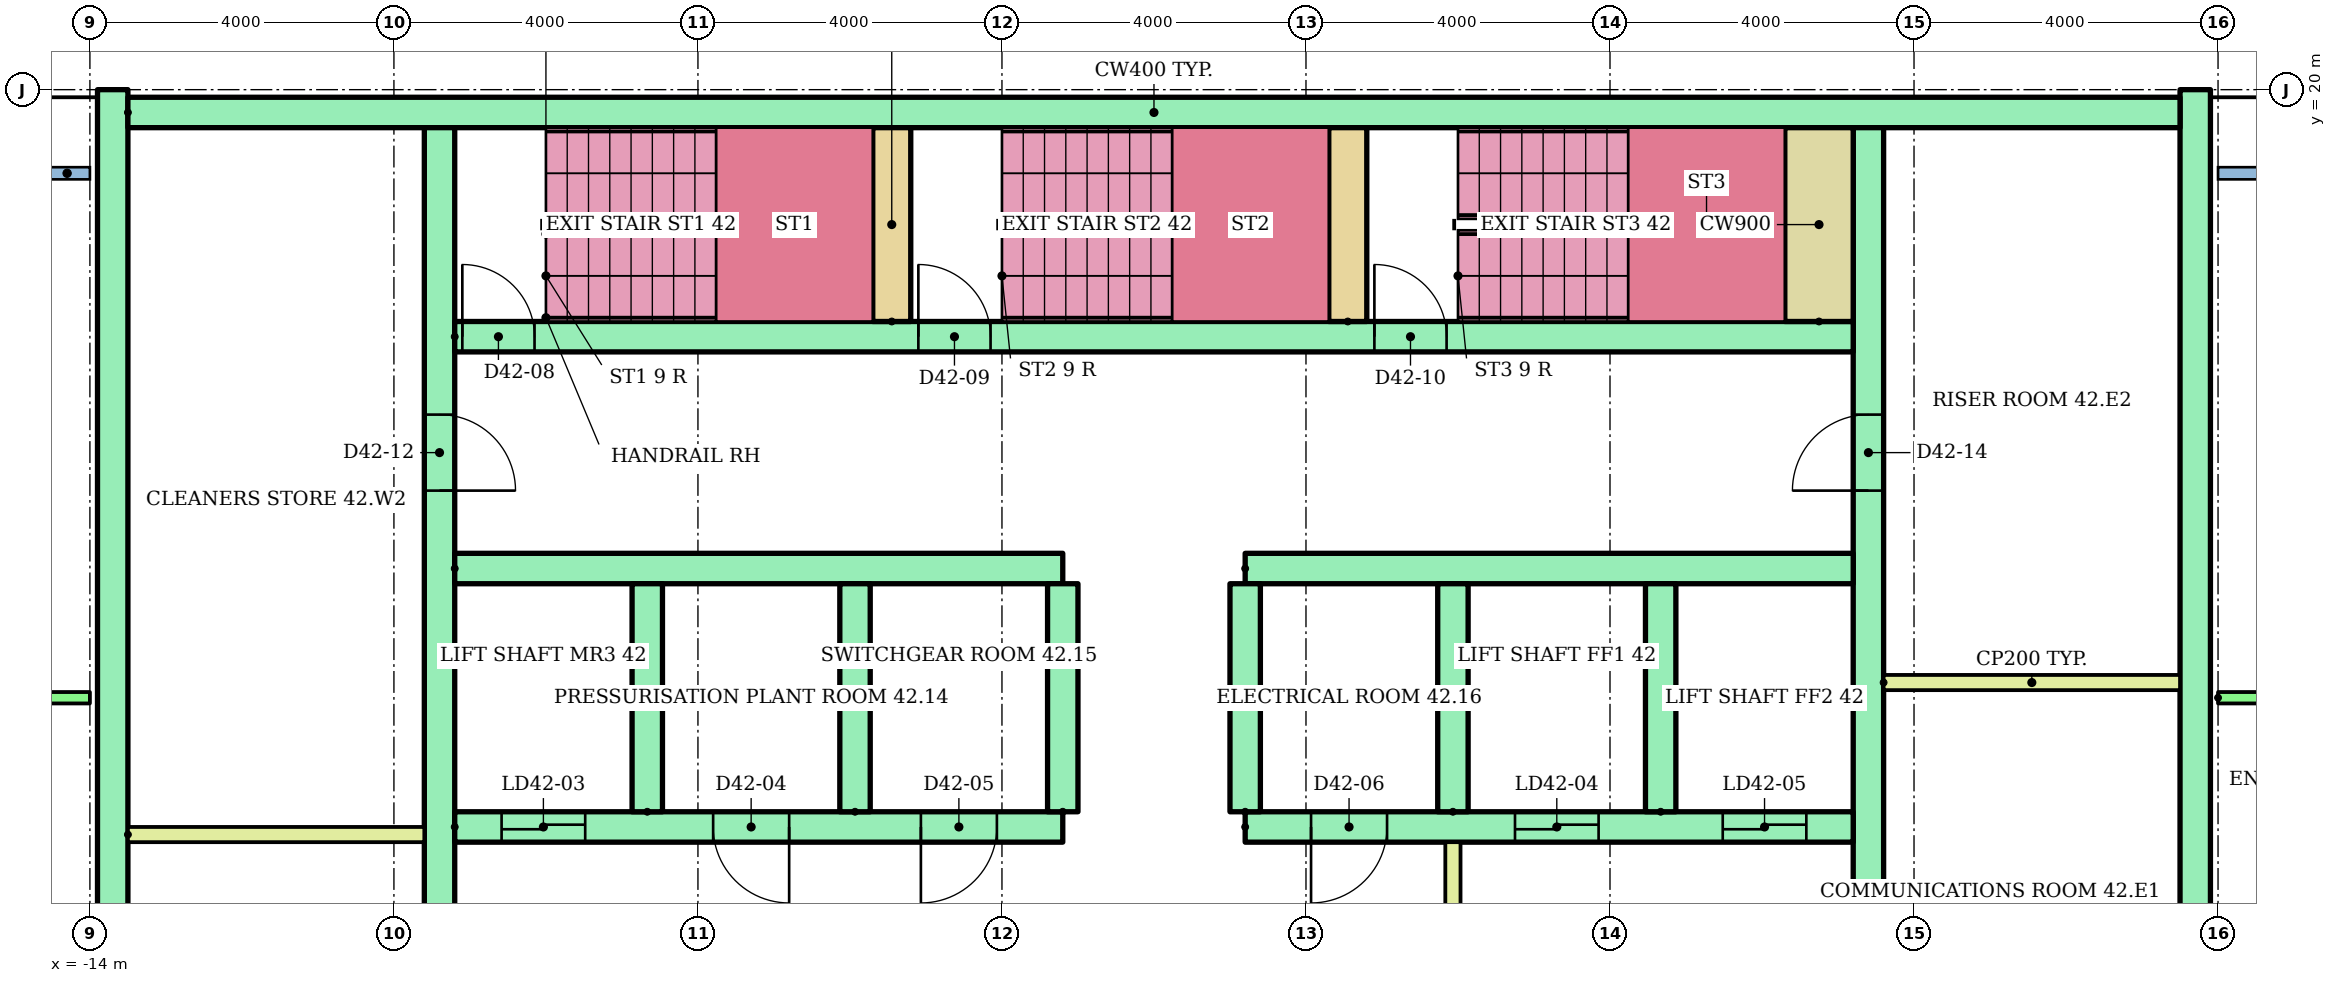
"""IFC4 building model, lengths in metres.
Left out: names, types, materials, properties, quantities, classifications, styles, units other than length and angle.
Written with IfcOpenShell. Run it as: python <this file> out.ifc"""

import sys

from ifc_helpers import new_model, si_unit, direction, frame, frame_2d, origin, place, context, subcontext, project, spatial, rectangle, extrude, element, fill, save


model = new_model("IFC4")
c1 = context("Model", 3, precision=1e-05, world=origin(), true_north=direction((0.0, 1.0)))
c2 = subcontext(c1, "Body", "Model", "MODEL_VIEW")
j1 = project(units=[si_unit("LENGTHUNIT", "METRE"), si_unit("PLANEANGLEUNIT", "RADIAN")], contexts=[c1])
p1 = place(None, origin())
s1 = spatial("IfcSite", under=j1, at=p1, CompositionType="ELEMENT")
p2 = place(p1, origin())
s2 = spatial("IfcBuilding", under=s1, at=p2, CompositionType="ELEMENT")
p3 = place(p2, frame((0.0, 0.0, 165.3)))
s3 = spatial("IfcBuildingStorey", under=s2, at=p3, CompositionType="ELEMENT", Elevation=165.3)
for number, where, z_axis, x_axis in (
    (1, (-13.7, 3.0, 0.0), (0.0, 0.0, 1.0), (0.0, 1.0, 0.0)),
    (2, (13.7, 3.0, 0.0), (0.0, 0.0, 1.0), (0.0, 1.0, 0.0)),
):
    element("IfcWall", number, at=place(p3, frame(where, z_axis=z_axis, x_axis=x_axis)), inside=s3, PredefinedType="SHEAR", context=c2, shape_type="SweptSolid", body=[
        extrude(rectangle(XDim=17.0, YDim=0.4, at=frame_2d((8.5, 0.0))), origin(), (0.0, 0.0, 1.0), 2.92),
    ])
p4 = place(p3, frame((-13.5, 19.7, 0.0)))
e3 = element("IfcWall", 3, at=p4, inside=s3, PredefinedType="SHEAR", context=c2, shape_type="SweptSolid", body=[
    extrude(rectangle(XDim=27.0, YDim=0.4, at=frame_2d((13.5, 0.0))), origin(), (0.0, 0.0, 1.0), 2.92),
])
p5 = place(p3, frame((-9.4, 6.8, 0.0), z_axis=(0.0, 0.0, 1.0), x_axis=(0.0, 1.0, 0.0)))
e4 = element("IfcWall", 4, at=p5, inside=s3, PredefinedType="SHEAR", context=c2, shape_type="SweptSolid", body=[
    extrude(rectangle(XDim=12.7, YDim=0.4, at=frame_2d((6.35, 0.0))), origin(), (0.0, 0.0, 1.0), 2.92),
])
p6 = place(p5, frame((1.15, 0.0, 0.0)))
e5 = element("IfcOpeningElement", 5, at=p6, cuts=e4, PredefinedType="OPENING", context=c2, shape_type="SweptSolid", body=[
    extrude(rectangle(XDim=1.0, YDim=2.1, at=frame_2d((0.5, 1.05))), frame((0.0, 0.21, 0.0), z_axis=(0.0, -1.0, 0.0), x_axis=(1.0, 0.0, 0.0)), (0.0, 0.0, 1.0), 0.42),
])
p7 = place(p5, frame((7.925, 0.0, 0.0)))
e6 = element("IfcOpeningElement", 6, at=p7, cuts=e4, PredefinedType="OPENING", context=c2, shape_type="SweptSolid", body=[
    extrude(rectangle(XDim=1.0, YDim=2.1, at=frame_2d((0.5, 1.05))), frame((0.0, 0.21, 0.0), z_axis=(0.0, -1.0, 0.0), x_axis=(1.0, 0.0, 0.0)), (0.0, 0.0, 1.0), 0.42),
])
p8 = place(p3, frame((9.4, 6.8, 0.0), z_axis=(0.0, 0.0, 1.0), x_axis=(0.0, 1.0, 0.0)))
e7 = element("IfcWall", 7, at=p8, inside=s3, PredefinedType="SHEAR", context=c2, shape_type="SweptSolid", body=[
    extrude(rectangle(XDim=12.7, YDim=0.4, at=frame_2d((6.35, 0.0))), origin(), (0.0, 0.0, 1.0), 2.92),
])
p9 = place(p8, frame((1.15, 0.0, 0.0)))
e8 = element("IfcOpeningElement", 8, at=p9, cuts=e7, PredefinedType="OPENING", context=c2, shape_type="SweptSolid", body=[
    extrude(rectangle(XDim=1.0, YDim=2.1, at=frame_2d((0.5, 1.05))), frame((0.0, 0.21, 0.0), z_axis=(0.0, -1.0, 0.0), x_axis=(1.0, 0.0, 0.0)), (0.0, 0.0, 1.0), 0.42),
])
p10 = place(p8, frame((7.925, 0.0, 0.0)))
e9 = element("IfcOpeningElement", 9, at=p10, cuts=e7, PredefinedType="OPENING", context=c2, shape_type="SweptSolid", body=[
    extrude(rectangle(XDim=1.0, YDim=2.1, at=frame_2d((0.5, 1.05))), frame((0.0, 0.21, 0.0), z_axis=(0.0, -1.0, 0.0), x_axis=(1.0, 0.0, 0.0)), (0.0, 0.0, 1.0), 0.42),
])
p11 = place(p3, frame((-9.2, 10.3, 0.0)))
e10 = element("IfcWall", 10, at=p11, inside=s3, PredefinedType="SHEAR", context=c2, shape_type="SweptSolid", body=[
    extrude(rectangle(XDim=8.0, YDim=0.4, at=frame_2d((4.0, 0.0))), origin(), (0.0, 0.0, 1.0), 2.92),
])
p12 = place(p11, frame((0.617, 0.0, 0.0)))
e11 = element("IfcOpeningElement", 11, at=p12, cuts=e10, PredefinedType="OPENING", context=c2, shape_type="SweptSolid", body=[
    extrude(rectangle(XDim=1.1, YDim=2.1, at=frame_2d((0.55, 1.05))), frame((0.0, 0.21, 0.0), z_axis=(0.0, -1.0, 0.0), x_axis=(1.0, 0.0, 0.0)), (0.0, 0.0, 1.0), 0.42),
])
p13 = place(p11, frame((3.4, 0.0, 0.0)))
e12 = element("IfcOpeningElement", 12, at=p13, cuts=e10, PredefinedType="OPENING", context=c2, shape_type="SweptSolid", body=[
    extrude(rectangle(XDim=1.0, YDim=2.1, at=frame_2d((0.5, 1.05))), frame((0.0, 0.21, 0.0), z_axis=(0.0, -1.0, 0.0), x_axis=(1.0, 0.0, 0.0)), (0.0, 0.0, 1.0), 0.42),
])
p14 = place(p11, frame((6.133, 0.0, 0.0)))
e13 = element("IfcOpeningElement", 13, at=p14, cuts=e10, PredefinedType="OPENING", context=c2, shape_type="SweptSolid", body=[
    extrude(rectangle(XDim=1.0, YDim=2.1, at=frame_2d((0.5, 1.05))), frame((0.0, 0.21, 0.0), z_axis=(0.0, -1.0, 0.0), x_axis=(1.0, 0.0, 0.0)), (0.0, 0.0, 1.0), 0.42),
])
p15 = place(p3, frame((-9.2, 13.7, 0.0)))
e14 = element("IfcWall", 14, at=p15, inside=s3, PredefinedType="SHEAR", context=c2, shape_type="SweptSolid", body=[
    extrude(rectangle(XDim=8.0, YDim=0.4, at=frame_2d((4.0, 0.0))), origin(), (0.0, 0.0, 1.0), 2.92),
])
p16 = place(p3, frame((1.2, 10.3, 0.0)))
e15 = element("IfcWall", 15, at=p16, inside=s3, PredefinedType="SHEAR", context=c2, shape_type="SweptSolid", body=[
    extrude(rectangle(XDim=8.0, YDim=0.4, at=frame_2d((4.0, 0.0))), origin(), (0.0, 0.0, 1.0), 2.92),
])
p17 = place(p16, frame((3.55, 0.0, 0.0)))
e16 = element("IfcOpeningElement", 16, at=p17, cuts=e15, PredefinedType="OPENING", context=c2, shape_type="SweptSolid", body=[
    extrude(rectangle(XDim=1.1, YDim=2.1, at=frame_2d((0.55, 1.05))), frame((0.0, 0.21, 0.0), z_axis=(0.0, -1.0, 0.0), x_axis=(1.0, 0.0, 0.0)), (0.0, 0.0, 1.0), 0.42),
])
p18 = place(p16, frame((6.283, 0.0, 0.0)))
e17 = element("IfcOpeningElement", 17, at=p18, cuts=e15, PredefinedType="OPENING", context=c2, shape_type="SweptSolid", body=[
    extrude(rectangle(XDim=1.1, YDim=2.1, at=frame_2d((0.55, 1.05))), frame((0.0, 0.21, 0.0), z_axis=(0.0, -1.0, 0.0), x_axis=(1.0, 0.0, 0.0)), (0.0, 0.0, 1.0), 0.42),
])
p19 = place(p16, frame((0.867, 0.0, 0.0)))
e18 = element("IfcOpeningElement", 18, at=p19, cuts=e15, PredefinedType="OPENING", context=c2, shape_type="SweptSolid", body=[
    extrude(rectangle(XDim=1.0, YDim=2.1, at=frame_2d((0.5, 1.05))), frame((0.0, 0.21, 0.0), z_axis=(0.0, -1.0, 0.0), x_axis=(1.0, 0.0, 0.0)), (0.0, 0.0, 1.0), 0.42),
])
p20 = place(p3, frame((1.2, 13.7, 0.0)))
e19 = element("IfcWall", 19, at=p20, inside=s3, PredefinedType="SHEAR", context=c2, shape_type="SweptSolid", body=[
    extrude(rectangle(XDim=8.0, YDim=0.4, at=frame_2d((4.0, 0.0))), origin(), (0.0, 0.0, 1.0), 2.92),
])
for number, where, z_axis, x_axis in (
    (20, (-6.667, 10.5, 0.0), (0.0, 0.0, 1.0), (0.0, 1.0, 0.0)),
    (21, (-3.933, 10.5, 0.0), (0.0, 0.0, 1.0), (0.0, 1.0, 0.0)),
    (22, (-1.2, 10.5, 0.0), (0.0, 0.0, 1.0), (0.0, 1.0, 0.0)),
    (23, (1.2, 10.5, 0.0), (0.0, 0.0, 1.0), (0.0, 1.0, 0.0)),
    (24, (3.933, 10.5, 0.0), (0.0, 0.0, 1.0), (0.0, 1.0, 0.0)),
    (25, (6.667, 10.5, 0.0), (0.0, 0.0, 1.0), (0.0, 1.0, 0.0)),
):
    element("IfcWall", number, at=place(p3, frame(where, z_axis=z_axis, x_axis=x_axis)), inside=s3, PredefinedType="SHEAR", context=c2, shape_type="SweptSolid", body=[
        extrude(rectangle(XDim=3.0, YDim=0.4, at=frame_2d((1.5, 0.0))), origin(), (0.0, 0.0, 1.0), 2.92),
    ])
p21 = place(p3, frame((3.933, 6.8, 0.0), z_axis=(0.0, 0.0, 1.0), x_axis=(0.0, 1.0, 0.0)))
e26 = element("IfcWall", 26, at=p21, inside=s3, PredefinedType="PARTITIONING", context=c2, shape_type="SweptSolid", body=[
    extrude(rectangle(XDim=3.3, YDim=0.2, at=frame_2d((1.65, 0.0))), origin(), (0.0, 0.0, 1.0), 2.92),
])
p22 = place(p21, frame((1.1, 0.0, 0.0)))
e27 = element("IfcOpeningElement", 27, at=p22, cuts=e26, PredefinedType="OPENING", context=c2, shape_type="SweptSolid", body=[
    extrude(rectangle(XDim=1.1, YDim=2.1, at=frame_2d((0.55, 1.05))), frame((0.0, 0.11, 0.0), z_axis=(0.0, -1.0, 0.0), x_axis=(1.0, 0.0, 0.0)), (0.0, 0.0, 1.0), 0.22),
])
p23 = place(p3, frame((-9.2, 16.75, 0.0)))
e28 = element("IfcWall", 28, at=p23, inside=s3, PredefinedType="SHEAR", context=c2, shape_type="SweptSolid", body=[
    extrude(rectangle(XDim=18.4, YDim=0.4, at=frame_2d((9.2, 0.0))), origin(), (0.0, 0.0, 1.0), 2.92),
])
p24 = place(p23, frame((0.1, 0.0, 0.0)))
e29 = element("IfcOpeningElement", 29, at=p24, cuts=e28, PredefinedType="OPENING", context=c2, shape_type="SweptSolid", body=[
    extrude(rectangle(XDim=0.95, YDim=2.1, at=frame_2d((0.475, 1.05))), frame((0.0, 0.21, 0.0), z_axis=(0.0, -1.0, 0.0), x_axis=(1.0, 0.0, 0.0)), (0.0, 0.0, 1.0), 0.42),
])
p25 = place(p23, frame((6.1, 0.0, 0.0)))
e30 = element("IfcOpeningElement", 30, at=p25, cuts=e28, PredefinedType="OPENING", context=c2, shape_type="SweptSolid", body=[
    extrude(rectangle(XDim=0.95, YDim=2.1, at=frame_2d((0.475, 1.05))), frame((0.0, 0.21, 0.0), z_axis=(0.0, -1.0, 0.0), x_axis=(1.0, 0.0, 0.0)), (0.0, 0.0, 1.0), 0.42),
])
p26 = place(p23, frame((12.1, 0.0, 0.0)))
e31 = element("IfcOpeningElement", 31, at=p26, cuts=e28, PredefinedType="OPENING", context=c2, shape_type="SweptSolid", body=[
    extrude(rectangle(XDim=0.95, YDim=2.1, at=frame_2d((0.475, 1.05))), frame((0.0, 0.21, 0.0), z_axis=(0.0, -1.0, 0.0), x_axis=(1.0, 0.0, 0.0)), (0.0, 0.0, 1.0), 0.42),
])
for number, where, z_axis, x_axis in (
    (32, (-3.45, 16.95, 0.0), (0.0, 0.0, 1.0), (0.0, 1.0, 0.0)),
    (33, (2.55, 16.95, 0.0), (0.0, 0.0, 1.0), (0.0, 1.0, 0.0)),
):
    element("IfcWall", number, at=place(p3, frame(where, z_axis=z_axis, x_axis=x_axis)), inside=s3, PredefinedType="SHEAR", context=c2, shape_type="SweptSolid", body=[
        extrude(rectangle(XDim=2.55, YDim=0.5, at=frame_2d((1.275, 0.0))), origin(), (0.0, 0.0, 1.0), 2.92),
    ])
p27 = place(p3, frame((8.75, 16.95, 0.0), z_axis=(0.0, 0.0, 1.0), x_axis=(0.0, 1.0, 0.0)))
e34 = element("IfcWall", 34, at=p27, inside=s3, PredefinedType="SHEAR", context=c2, shape_type="SweptSolid", body=[
    extrude(rectangle(XDim=2.55, YDim=0.9, at=frame_2d((1.275, 0.0))), origin(), (0.0, 0.0, 1.0), 2.92),
])
for number, where in (
    (35, (-13.5, 10.2, 0.0)),
    (36, (9.6, 12.2, 0.0)),
):
    element("IfcWall", number, at=place(p3, frame(where)), inside=s3, PredefinedType="PARTITIONING", context=c2, shape_type="SweptSolid", body=[
        extrude(rectangle(XDim=3.9, YDim=0.2, at=frame_2d((1.95, 0.0))), origin(), (0.0, 0.0, 1.0), 2.92),
    ])
p28 = place(p3, frame((-24.82, 12.0, 0.0)))
e37 = element("IfcWall", 37, at=p28, inside=s3, PredefinedType="PARTITIONING", context=c2, shape_type="SweptSolid", body=[
    extrude(rectangle(XDim=10.82, YDim=0.15, at=frame_2d((5.41, 0.0))), origin(), (0.0, 0.0, 1.0), 2.4),
])
p29 = place(p28, frame((1.273, 0.0, 0.0)))
e38 = element("IfcOpeningElement", 38, at=p29, cuts=e37, PredefinedType="OPENING", context=c2, shape_type="SweptSolid", body=[
    extrude(rectangle(XDim=1.0, YDim=2.1, at=frame_2d((0.5, 1.05))), frame((0.0, 0.085, 0.0), z_axis=(0.0, -1.0, 0.0), x_axis=(1.0, 0.0, 0.0)), (0.0, 0.0, 1.0), 0.17),
])
p30 = place(p28, frame((7.32, 0.0, 0.0)))
e39 = element("IfcOpeningElement", 39, at=p30, cuts=e37, PredefinedType="OPENING", context=c2, shape_type="SweptSolid", body=[
    extrude(rectangle(XDim=0.9, YDim=2.1, at=frame_2d((0.45, 1.05))), frame((0.0, 0.085, 0.0), z_axis=(0.0, -1.0, 0.0), x_axis=(1.0, 0.0, 0.0)), (0.0, 0.0, 1.0), 0.17),
])
p31 = place(p3, frame((14.0, 12.0, 0.0)))
e40 = element("IfcWall", 40, at=p31, inside=s3, PredefinedType="PARTITIONING", context=c2, shape_type="SweptSolid", body=[
    extrude(rectangle(XDim=12.0, YDim=0.15, at=frame_2d((6.0, 0.0))), origin(), (0.0, 0.0, 1.0), 2.4),
])
p32 = place(p31, frame((1.5, 0.0, 0.0)))
e41 = element("IfcOpeningElement", 41, at=p32, cuts=e40, PredefinedType="OPENING", context=c2, shape_type="SweptSolid", body=[
    extrude(rectangle(XDim=1.0, YDim=2.1, at=frame_2d((0.5, 1.05))), frame((0.0, 0.085, 0.0), z_axis=(0.0, -1.0, 0.0), x_axis=(1.0, 0.0, 0.0)), (0.0, 0.0, 1.0), 0.17),
])
p33 = place(p31, frame((7.55, 0.0, 0.0)))
e42 = element("IfcOpeningElement", 42, at=p33, cuts=e40, PredefinedType="OPENING", context=c2, shape_type="SweptSolid", body=[
    extrude(rectangle(XDim=0.9, YDim=2.1, at=frame_2d((0.45, 1.05))), frame((0.0, 0.085, 0.0), z_axis=(0.0, -1.0, 0.0), x_axis=(1.0, 0.0, 0.0)), (0.0, 0.0, 1.0), 0.17),
])
p34 = place(p12, origin())
e43 = element("IfcDoor", 43, at=p34, inside=s3, OperationType="SLIDING_TO_LEFT", PredefinedType="DOOR", context=c2, shape_type="SweptSolid", body=[
    extrude(rectangle(XDim=1.1, YDim=2.1, at=frame_2d((0.55, 1.05))), frame((0.0, 0.025, 0.0), z_axis=(0.0, -1.0, 0.0), x_axis=(1.0, 0.0, 0.0)), (0.0, 0.0, 1.0), 0.05),
])
fill(e11, e43)
p35 = place(p17, origin())
e44 = element("IfcDoor", 44, at=p35, inside=s3, OperationType="SLIDING_TO_LEFT", PredefinedType="DOOR", context=c2, shape_type="SweptSolid", body=[
    extrude(rectangle(XDim=1.1, YDim=2.1, at=frame_2d((0.55, 1.05))), frame((0.0, 0.025, 0.0), z_axis=(0.0, -1.0, 0.0), x_axis=(1.0, 0.0, 0.0)), (0.0, 0.0, 1.0), 0.05),
])
fill(e16, e44)
p36 = place(p18, origin())
e45 = element("IfcDoor", 45, at=p36, inside=s3, OperationType="SLIDING_TO_LEFT", PredefinedType="DOOR", context=c2, shape_type="SweptSolid", body=[
    extrude(rectangle(XDim=1.1, YDim=2.1, at=frame_2d((0.55, 1.05))), frame((0.0, 0.025, 0.0), z_axis=(0.0, -1.0, 0.0), x_axis=(1.0, 0.0, 0.0)), (0.0, 0.0, 1.0), 0.05),
])
fill(e17, e45)
p37 = place(p13, frame((1.0, 0.0, 0.0), z_axis=(0.0, 0.0, 1.0), x_axis=(-1.0, 0.0, 0.0)))
e46 = element("IfcDoor", 46, at=p37, inside=s3, OperationType="SINGLE_SWING_RIGHT", PredefinedType="DOOR", context=c2, shape_type="SweptSolid", body=[
    extrude(rectangle(XDim=1.0, YDim=2.1, at=frame_2d((0.5, 1.05))), frame((0.0, 0.025, 0.0), z_axis=(0.0, -1.0, 0.0), x_axis=(1.0, 0.0, 0.0)), (0.0, 0.0, 1.0), 0.05),
])
fill(e12, e46)
p38 = place(p14, frame((1.0, 0.0, 0.0), z_axis=(0.0, 0.0, 1.0), x_axis=(-1.0, 0.0, 0.0)))
e47 = element("IfcDoor", 47, at=p38, inside=s3, OperationType="SINGLE_SWING_LEFT", PredefinedType="DOOR", context=c2, shape_type="SweptSolid", body=[
    extrude(rectangle(XDim=1.0, YDim=2.1, at=frame_2d((0.5, 1.05))), frame((0.0, 0.025, 0.0), z_axis=(0.0, -1.0, 0.0), x_axis=(1.0, 0.0, 0.0)), (0.0, 0.0, 1.0), 0.05),
])
fill(e13, e47)
p39 = place(p19, frame((1.0, 0.0, 0.0), z_axis=(0.0, 0.0, 1.0), x_axis=(-1.0, 0.0, 0.0)))
e48 = element("IfcDoor", 48, at=p39, inside=s3, OperationType="SINGLE_SWING_LEFT", PredefinedType="DOOR", context=c2, shape_type="SweptSolid", body=[
    extrude(rectangle(XDim=1.0, YDim=2.1, at=frame_2d((0.5, 1.05))), frame((0.0, 0.025, 0.0), z_axis=(0.0, -1.0, 0.0), x_axis=(1.0, 0.0, 0.0)), (0.0, 0.0, 1.0), 0.05),
])
fill(e18, e48)
p40 = place(p24, origin())
e49 = element("IfcDoor", 49, at=p40, inside=s3, OperationType="SINGLE_SWING_LEFT", PredefinedType="DOOR", context=c2, shape_type="SweptSolid", body=[
    extrude(rectangle(XDim=0.95, YDim=2.1, at=frame_2d((0.475, 1.05))), frame((0.0, 0.025, 0.0), z_axis=(0.0, -1.0, 0.0), x_axis=(1.0, 0.0, 0.0)), (0.0, 0.0, 1.0), 0.05),
])
fill(e29, e49)
p41 = place(p25, origin())
e50 = element("IfcDoor", 50, at=p41, inside=s3, OperationType="SINGLE_SWING_LEFT", PredefinedType="DOOR", context=c2, shape_type="SweptSolid", body=[
    extrude(rectangle(XDim=0.95, YDim=2.1, at=frame_2d((0.475, 1.05))), frame((0.0, 0.025, 0.0), z_axis=(0.0, -1.0, 0.0), x_axis=(1.0, 0.0, 0.0)), (0.0, 0.0, 1.0), 0.05),
])
fill(e30, e50)
p42 = place(p26, origin())
e51 = element("IfcDoor", 51, at=p42, inside=s3, OperationType="SINGLE_SWING_LEFT", PredefinedType="DOOR", context=c2, shape_type="SweptSolid", body=[
    extrude(rectangle(XDim=0.95, YDim=2.1, at=frame_2d((0.475, 1.05))), frame((0.0, 0.025, 0.0), z_axis=(0.0, -1.0, 0.0), x_axis=(1.0, 0.0, 0.0)), (0.0, 0.0, 1.0), 0.05),
])
fill(e31, e51)
p43 = place(p7, frame((1.0, 0.0, 0.0), z_axis=(0.0, 0.0, 1.0), x_axis=(-1.0, 0.0, 0.0)))
e52 = element("IfcDoor", 52, at=p43, inside=s3, OperationType="SINGLE_SWING_LEFT", PredefinedType="DOOR", context=c2, shape_type="SweptSolid", body=[
    extrude(rectangle(XDim=1.0, YDim=2.1, at=frame_2d((0.5, 1.05))), frame((0.0, 0.025, 0.0), z_axis=(0.0, -1.0, 0.0), x_axis=(1.0, 0.0, 0.0)), (0.0, 0.0, 1.0), 0.05),
])
fill(e6, e52)
p44 = place(p10, origin())
e53 = element("IfcDoor", 53, at=p44, inside=s3, OperationType="SINGLE_SWING_LEFT", PredefinedType="DOOR", context=c2, shape_type="SweptSolid", body=[
    extrude(rectangle(XDim=1.0, YDim=2.1, at=frame_2d((0.5, 1.05))), frame((0.0, 0.025, 0.0), z_axis=(0.0, -1.0, 0.0), x_axis=(1.0, 0.0, 0.0)), (0.0, 0.0, 1.0), 0.05),
])
fill(e9, e53)
save(model, sys.argv[1])
